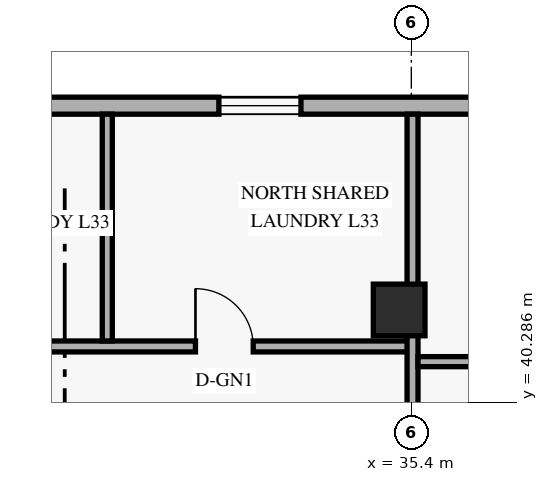
"""IFC4 building model, lengths in metres.
Left out: names, types, materials, properties, quantities, classifications, styles, units other than length and angle.
Written with IfcOpenShell. Run it as: python <this file> out.ifc"""

import sys

from ifc_helpers import new_model, si_unit, direction, frame, frame_2d, origin, origin_2d, place, context, subcontext, project, spatial, rectangle, extrude, element, fill, save


model = new_model("IFC4")
c1 = context("Model", 3, precision=1e-05, world=origin(), true_north=direction((0.0, 1.0)))
c2 = subcontext(c1, "Body", "Model", "MODEL_VIEW")
j1 = project(units=[si_unit("LENGTHUNIT", "METRE"), si_unit("PLANEANGLEUNIT", "RADIAN")], contexts=[c1])
p1 = place(None, origin())
s1 = spatial("IfcSite", under=j1, at=p1, CompositionType="ELEMENT")
p2 = place(p1, origin())
s2 = spatial("IfcBuilding", under=s1, at=p2, CompositionType="ELEMENT")
p3 = place(p2, frame((0.0, 0.0, 128.4)))
s3 = spatial("IfcBuildingStorey", under=s2, at=p3, CompositionType="ELEMENT", Elevation=128.4)
p4 = place(p3, frame((35.2, 41.8, 0.0), z_axis=(0.0, 0.0, 1.0), x_axis=(1.0, 0.0, 0.0)))
e1 = element("IfcColumn", 1, at=p4, inside=s3, PredefinedType="COLUMN", context=c2, shape_type="SweptSolid", body=[
    extrude(rectangle(XDim=0.85, YDim=0.85, at=origin_2d()), origin(), (0.0, 0.0, 1.0), 3.6),
])
p5 = place(p3, frame((49.98, 45.16, 0.0), z_axis=(0.0, 0.0, 1.0), x_axis=(-1.0, 0.0, 0.0)))
e2 = element("IfcWall", 2, at=p5, inside=s3, PredefinedType="SOLIDWALL", context=c2, shape_type="SweptSolid", body=[
    extrude(rectangle(XDim=36.56, YDim=0.28, at=frame_2d((18.28, 0.0))), origin(), (0.0, 0.0, 1.0), 3.36),
])
p6 = place(p5, frame((31.77, 0.0, 0.85)))
e3 = element("IfcOpeningElement", 3, at=p6, cuts=e2, PredefinedType="OPENING", context=c2, shape_type="SweptSolid", body=[
    extrude(rectangle(XDim=1.35, YDim=1.55, at=frame_2d((0.675, 0.775))), frame((0.0, 0.15, 0.0), z_axis=(0.0, -1.0, 0.0), x_axis=(1.0, 0.0, 0.0)), (0.0, 0.0, 1.0), 0.3),
])
p7 = place(p5, frame((23.28, 0.0, 0.85)))
e4 = element("IfcOpeningElement", 4, at=p7, cuts=e2, PredefinedType="OPENING", context=c2, shape_type="SweptSolid", body=[
    extrude(rectangle(XDim=1.35, YDim=1.55, at=frame_2d((0.675, 0.775))), frame((0.0, 0.15, 0.0), z_axis=(0.0, -1.0, 0.0), x_axis=(1.0, 0.0, 0.0)), (0.0, 0.0, 1.0), 0.3),
])
p8 = place(p5, frame((16.395, 0.0, 0.85)))
e5 = element("IfcOpeningElement", 5, at=p8, cuts=e2, PredefinedType="OPENING", context=c2, shape_type="SweptSolid", body=[
    extrude(rectangle(XDim=1.35, YDim=1.55, at=frame_2d((0.675, 0.775))), frame((0.0, 0.15, 0.0), z_axis=(0.0, -1.0, 0.0), x_axis=(1.0, 0.0, 0.0)), (0.0, 0.0, 1.0), 0.3),
])
p9 = place(p5, frame((10.49, 0.0, 0.85)))
e6 = element("IfcOpeningElement", 6, at=p9, cuts=e2, PredefinedType="OPENING", context=c2, shape_type="SweptSolid", body=[
    extrude(rectangle(XDim=1.35, YDim=1.55, at=frame_2d((0.675, 0.775))), frame((0.0, 0.15, 0.0), z_axis=(0.0, -1.0, 0.0), x_axis=(1.0, 0.0, 0.0)), (0.0, 0.0, 1.0), 0.3),
])
p10 = place(p5, frame((4.6, 0.0, 0.85)))
e7 = element("IfcOpeningElement", 7, at=p10, cuts=e2, PredefinedType="OPENING", context=c2, shape_type="SweptSolid", body=[
    extrude(rectangle(XDim=1.35, YDim=1.55, at=frame_2d((0.675, 0.775))), frame((0.0, 0.15, 0.0), z_axis=(0.0, -1.0, 0.0), x_axis=(1.0, 0.0, 0.0)), (0.0, 0.0, 1.0), 0.3),
])
p11 = place(p5, frame((0.715, 0.0, 0.85)))
e8 = element("IfcOpeningElement", 8, at=p11, cuts=e2, PredefinedType="OPENING", context=c2, shape_type="SweptSolid", body=[
    extrude(rectangle(XDim=1.35, YDim=1.55, at=frame_2d((0.675, 0.775))), frame((0.0, 0.15, 0.0), z_axis=(0.0, -1.0, 0.0), x_axis=(1.0, 0.0, 0.0)), (0.0, 0.0, 1.0), 0.3),
])
p12 = place(p3, frame((21.74, 41.2, 0.0), z_axis=(0.0, 0.0, 1.0), x_axis=(1.0, 0.0, 0.0)))
e9 = element("IfcWall", 9, at=p12, inside=s3, PredefinedType="STANDARD", context=c2, shape_type="SweptSolid", body=[
    extrude(rectangle(XDim=13.68, YDim=0.18, at=frame_2d((6.84, 0.0))), origin(), (0.0, 0.0, 1.0), 2.731),
])
p13 = place(p12, frame((3.09, 0.0, 0.0)))
e10 = element("IfcOpeningElement", 10, at=p13, cuts=e9, PredefinedType="OPENING", context=c2, shape_type="SweptSolid", body=[
    extrude(rectangle(XDim=0.95, YDim=2.15, at=frame_2d((0.475, 1.075))), frame((0.0, 0.1, 0.0), z_axis=(0.0, -1.0, 0.0), x_axis=(1.0, 0.0, 0.0)), (0.0, 0.0, 1.0), 0.2),
])
p14 = place(p12, frame((10.11, 0.0, 0.0)))
e11 = element("IfcOpeningElement", 11, at=p14, cuts=e9, PredefinedType="OPENING", context=c2, shape_type="SweptSolid", body=[
    extrude(rectangle(XDim=0.95, YDim=2.15, at=frame_2d((0.475, 1.075))), frame((0.0, 0.1, 0.0), z_axis=(0.0, -1.0, 0.0), x_axis=(1.0, 0.0, 0.0)), (0.0, 0.0, 1.0), 0.2),
])
p15 = place(p3, frame((35.42, 38.75, 0.0), z_axis=(0.0, 0.0, 1.0), x_axis=(0.0, 1.0, 0.0)))
e12 = element("IfcWall", 12, at=p15, inside=s3, PredefinedType="PARTITIONING", context=c2, shape_type="SweptSolid", body=[
    extrude(rectangle(XDim=6.27, YDim=0.18, at=frame_2d((3.135, 0.0))), origin(), (0.0, 0.0, 1.0), 2.731),
])
p16 = place(p3, frame((35.51, 40.95, 0.0), z_axis=(0.0, 0.0, 1.0), x_axis=(1.0, 0.0, 0.0)))
e13 = element("IfcWall", 13, at=p16, inside=s3, PredefinedType="PARTITIONING", context=c2, shape_type="SweptSolid", body=[
    extrude(rectangle(XDim=6.78, YDim=0.165, at=frame_2d((3.39, 0.0))), origin(), (0.0, 0.0, 1.0), 3.36),
])
p17 = place(p16, frame((2.755, 0.0, 0.0)))
e14 = element("IfcOpeningElement", 14, at=p17, cuts=e13, PredefinedType="OPENING", context=c2, shape_type="SweptSolid", body=[
    extrude(rectangle(XDim=0.95, YDim=2.15, at=frame_2d((0.475, 1.075))), frame((0.0, 0.093, 0.0), z_axis=(0.0, -1.0, 0.0), x_axis=(1.0, 0.0, 0.0)), (0.0, 0.0, 1.0), 0.185),
])
p18 = place(p3, frame((30.4, 41.29, 0.0), z_axis=(0.0, 0.0, 1.0), x_axis=(0.0, 1.0, 0.0)))
e15 = element("IfcWall", 15, at=p18, inside=s3, PredefinedType="PARTITIONING", context=c2, shape_type="SweptSolid", body=[
    extrude(rectangle(XDim=3.73, YDim=0.165, at=frame_2d((1.865, 0.0))), origin(), (0.0, 0.0, 1.0), 2.809),
])
p19 = place(p8, origin())
e16 = element("IfcWindow", 16, at=p19, inside=s3, PartitioningType="SINGLE_PANEL", PredefinedType="WINDOW", context=c2, shape_type="SweptSolid", body=[
    extrude(rectangle(XDim=1.35, YDim=1.55, at=frame_2d((0.675, 0.775))), frame((0.0, 0.03, 0.0), z_axis=(0.0, -1.0, 0.0), x_axis=(1.0, 0.0, 0.0)), (0.0, 0.0, 1.0), 0.06),
])
fill(e5, e16)
p20 = place(p14, origin())
e17 = element("IfcDoor", 17, at=p20, inside=s3, OperationType="SINGLE_SWING_LEFT", PredefinedType="DOOR", context=c2, shape_type="SweptSolid", body=[
    extrude(rectangle(XDim=0.95, YDim=2.15, at=frame_2d((0.475, 1.075))), frame((0.0, 0.025, 0.0), z_axis=(0.0, -1.0, 0.0), x_axis=(1.0, 0.0, 0.0)), (0.0, 0.0, 1.0), 0.05),
])
fill(e11, e17)
save(model, sys.argv[1])
